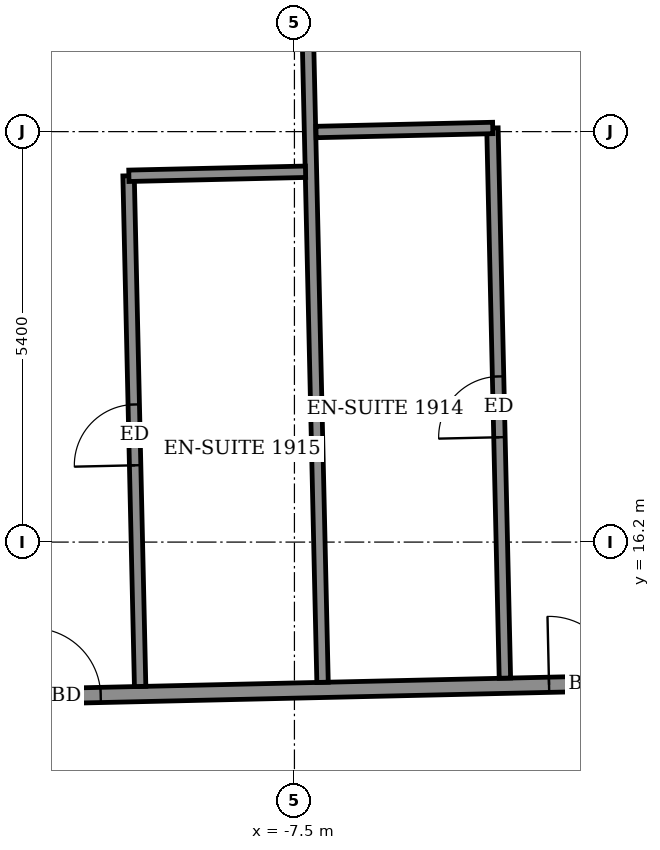
"""IFC4 building model, lengths in metres.
Left out: names, types, materials, properties, quantities, classifications, styles, units other than length and angle.
Written with IfcOpenShell. Run it as: python <this file> out.ifc"""

import sys

from ifc_helpers import new_model, si_unit, direction, frame, frame_2d, origin, place, context, subcontext, project, spatial, rectangle, extrude, element, fill, save


model = new_model("IFC4")
c1 = context("Model", 3, precision=1e-05, world=origin(), true_north=direction((0.0, 1.0)))
c2 = subcontext(c1, "Body", "Model", "MODEL_VIEW")
j1 = project(units=[si_unit("LENGTHUNIT", "METRE"), si_unit("PLANEANGLEUNIT", "RADIAN")], contexts=[c1])
p1 = place(None, origin())
s1 = spatial("IfcSite", under=j1, at=p1, CompositionType="ELEMENT")
p2 = place(p1, origin())
s2 = spatial("IfcBuilding", under=s1, at=p2, CompositionType="ELEMENT")
p3 = place(p2, frame((0.0, 0.0, 79.3)))
s3 = spatial("IfcBuildingStorey", under=s2, at=p3, CompositionType="ELEMENT", Elevation=79.3)
p4 = place(p3, frame((-24.895, 13.852, 0.0), z_axis=(0.0, 0.0, 1.0), x_axis=(0.999742765181, 0.02268046447, 0.0)))
e1 = element("IfcWall", 1, at=p4, inside=s3, PredefinedType="PARTITIONING", context=c2, shape_type="SweptSolid", body=[
    extrude(rectangle(XDim=52.422, YDim=0.2, at=frame_2d((26.211, 0.0))), origin(), (0.0, 0.0, 1.0), 3.05),
])
p5 = place(p4, frame((50.186, 0.0, 0.0)))
e2 = element("IfcOpeningElement", 2, at=p5, cuts=e1, PredefinedType="OPENING", context=c2, shape_type="SweptSolid", body=[
    extrude(rectangle(XDim=1.0, YDim=2.1, at=frame_2d((0.5, 1.05))), frame((0.0, 0.11, 0.0), z_axis=(0.0, -1.0, 0.0), x_axis=(1.0, 0.0, 0.0)), (0.0, 0.0, 1.0), 0.22),
])
p6 = place(p4, frame((45.175, 0.0, 0.0)))
e3 = element("IfcOpeningElement", 3, at=p6, cuts=e1, PredefinedType="OPENING", context=c2, shape_type="SweptSolid", body=[
    extrude(rectangle(XDim=0.9, YDim=2.1, at=frame_2d((0.45, 1.05))), frame((0.0, 0.11, 0.0), z_axis=(0.0, -1.0, 0.0), x_axis=(1.0, 0.0, 0.0)), (0.0, 0.0, 1.0), 0.22),
])
p7 = place(p4, frame((40.625, 0.0, 0.0)))
e4 = element("IfcOpeningElement", 4, at=p7, cuts=e1, PredefinedType="OPENING", context=c2, shape_type="SweptSolid", body=[
    extrude(rectangle(XDim=0.9, YDim=2.1, at=frame_2d((0.45, 1.05))), frame((0.0, 0.11, 0.0), z_axis=(0.0, -1.0, 0.0), x_axis=(1.0, 0.0, 0.0)), (0.0, 0.0, 1.0), 0.22),
])
p8 = place(p4, frame((38.65, 0.0, 0.0)))
e5 = element("IfcOpeningElement", 5, at=p8, cuts=e1, PredefinedType="OPENING", context=c2, shape_type="SweptSolid", body=[
    extrude(rectangle(XDim=0.9, YDim=2.1, at=frame_2d((0.45, 1.05))), frame((0.0, 0.11, 0.0), z_axis=(0.0, -1.0, 0.0), x_axis=(1.0, 0.0, 0.0)), (0.0, 0.0, 1.0), 0.22),
])
p9 = place(p4, frame((31.725, 0.0, 0.0)))
e6 = element("IfcOpeningElement", 6, at=p9, cuts=e1, PredefinedType="OPENING", context=c2, shape_type="SweptSolid", body=[
    extrude(rectangle(XDim=0.9, YDim=2.1, at=frame_2d((0.45, 1.05))), frame((0.0, 0.11, 0.0), z_axis=(0.0, -1.0, 0.0), x_axis=(1.0, 0.0, 0.0)), (0.0, 0.0, 1.0), 0.22),
])
p10 = place(p4, frame((29.575, 0.0, 0.0)))
e7 = element("IfcOpeningElement", 7, at=p10, cuts=e1, PredefinedType="OPENING", context=c2, shape_type="SweptSolid", body=[
    extrude(rectangle(XDim=0.9, YDim=2.1, at=frame_2d((0.45, 1.05))), frame((0.0, 0.11, 0.0), z_axis=(0.0, -1.0, 0.0), x_axis=(1.0, 0.0, 0.0)), (0.0, 0.0, 1.0), 0.22),
])
p11 = place(p4, frame((22.75, 0.0, 0.0)))
e8 = element("IfcOpeningElement", 8, at=p11, cuts=e1, PredefinedType="OPENING", context=c2, shape_type="SweptSolid", body=[
    extrude(rectangle(XDim=0.9, YDim=2.1, at=frame_2d((0.45, 1.05))), frame((0.0, 0.11, 0.0), z_axis=(0.0, -1.0, 0.0), x_axis=(1.0, 0.0, 0.0)), (0.0, 0.0, 1.0), 0.22),
])
p12 = place(p4, frame((20.75, 0.0, 0.0)))
e9 = element("IfcOpeningElement", 9, at=p12, cuts=e1, PredefinedType="OPENING", context=c2, shape_type="SweptSolid", body=[
    extrude(rectangle(XDim=0.9, YDim=2.1, at=frame_2d((0.45, 1.05))), frame((0.0, 0.11, 0.0), z_axis=(0.0, -1.0, 0.0), x_axis=(1.0, 0.0, 0.0)), (0.0, 0.0, 1.0), 0.22),
])
p13 = place(p4, frame((13.95, 0.0, 0.0)))
e10 = element("IfcOpeningElement", 10, at=p13, cuts=e1, PredefinedType="OPENING", context=c2, shape_type="SweptSolid", body=[
    extrude(rectangle(XDim=0.9, YDim=2.1, at=frame_2d((0.45, 1.05))), frame((0.0, 0.11, 0.0), z_axis=(0.0, -1.0, 0.0), x_axis=(1.0, 0.0, 0.0)), (0.0, 0.0, 1.0), 0.22),
])
p14 = place(p4, frame((11.85, 0.0, 0.0)))
e11 = element("IfcOpeningElement", 11, at=p14, cuts=e1, PredefinedType="OPENING", context=c2, shape_type="SweptSolid", body=[
    extrude(rectangle(XDim=0.9, YDim=2.1, at=frame_2d((0.45, 1.05))), frame((0.0, 0.11, 0.0), z_axis=(0.0, -1.0, 0.0), x_axis=(1.0, 0.0, 0.0)), (0.0, 0.0, 1.0), 0.22),
])
p15 = place(p4, frame((1.425, 0.0, 0.0)))
e12 = element("IfcOpeningElement", 12, at=p15, cuts=e1, PredefinedType="OPENING", context=c2, shape_type="SweptSolid", body=[
    extrude(rectangle(XDim=1.0, YDim=2.1, at=frame_2d((0.5, 1.05))), frame((0.0, 0.11, 0.0), z_axis=(0.0, -1.0, 0.0), x_axis=(1.0, 0.0, 0.0)), (0.0, 0.0, 1.0), 0.22),
])
p16 = place(p4, frame((6.925, 0.0, 0.0)))
e13 = element("IfcOpeningElement", 13, at=p16, cuts=e1, PredefinedType="OPENING", context=c2, shape_type="SweptSolid", body=[
    extrude(rectangle(XDim=0.9, YDim=2.1, at=frame_2d((0.45, 1.05))), frame((0.0, 0.11, 0.0), z_axis=(0.0, -1.0, 0.0), x_axis=(1.0, 0.0, 0.0)), (0.0, 0.0, 1.0), 0.22),
])
p17 = place(p3, frame((-9.53, 14.301, 0.0), z_axis=(0.0, 0.0, 1.0), x_axis=(-0.022598435707, 0.999744622743, 0.0)))
e14 = element("IfcWall", 14, at=p17, inside=s3, PredefinedType="PARTITIONING", context=c2, shape_type="SweptSolid", body=[
    extrude(rectangle(XDim=6.72, YDim=0.15, at=frame_2d((3.36, 0.0))), origin(), (0.0, 0.0, 1.0), 3.05),
])
p18 = place(p17, frame((2.91, 0.0, 0.0)))
e15 = element("IfcOpeningElement", 15, at=p18, cuts=e14, PredefinedType="OPENING", context=c2, shape_type="SweptSolid", body=[
    extrude(rectangle(XDim=0.8, YDim=2.1, at=frame_2d((0.4, 1.05))), frame((0.0, 0.085, 0.0), z_axis=(0.0, -1.0, 0.0), x_axis=(1.0, 0.0, 0.0)), (0.0, 0.0, 1.0), 0.17),
])
p19 = place(p3, frame((-7.13, 14.355, 0.0), z_axis=(0.0, 0.0, 1.0), x_axis=(-0.022759867473, 0.999740960666, 0.0)))
e16 = element("IfcWall", 16, at=p19, inside=s3, PredefinedType="PARTITIONING", context=c2, shape_type="SweptSolid", body=[
    extrude(rectangle(XDim=12.4, YDim=0.15, at=frame_2d((6.2, 0.0))), origin(), (0.0, 0.0, 1.0), 2.55),
])
p20 = place(p3, frame((-4.731, 14.41, 0.0), z_axis=(0.0, 0.0, 1.0), x_axis=(-0.022660891034, 0.999743209038, 0.0)))
e17 = element("IfcWall", 17, at=p20, inside=s3, PredefinedType="PARTITIONING", context=c2, shape_type="SweptSolid", body=[
    extrude(rectangle(XDim=7.24, YDim=0.15, at=frame_2d((3.62, 0.0))), origin(), (0.0, 0.0, 1.0), 3.05),
])
p21 = place(p20, frame((3.17, 0.0, 0.0)))
e18 = element("IfcOpeningElement", 18, at=p21, cuts=e17, PredefinedType="OPENING", context=c2, shape_type="SweptSolid", body=[
    extrude(rectangle(XDim=0.8, YDim=2.1, at=frame_2d((0.4, 1.05))), frame((0.0, 0.085, 0.0), z_axis=(0.0, -1.0, 0.0), x_axis=(1.0, 0.0, 0.0)), (0.0, 0.0, 1.0), 0.17),
])
p22 = place(p3, frame((-9.678, 21.019, 0.0), z_axis=(0.0, 0.0, 1.0), x_axis=(0.999740260747, 0.02279059109, 0.0)))
e19 = element("IfcWall", 19, at=p22, inside=s3, PredefinedType="PARTITIONING", context=c2, shape_type="SweptSolid", body=[
    extrude(rectangle(XDim=2.324, YDim=0.15, at=frame_2d((1.162, 0.0))), origin(), (0.0, 0.0, 1.0), 3.05),
])
p23 = place(p3, frame((-7.216, 21.595, 0.0), z_axis=(0.0, 0.0, 1.0), x_axis=(0.999740478815, 0.022781023197, 0.0)))
e20 = element("IfcWall", 20, at=p23, inside=s3, PredefinedType="PARTITIONING", context=c2, shape_type="SweptSolid", body=[
    extrude(rectangle(XDim=2.325, YDim=0.15, at=frame_2d((1.163, 0.0))), origin(), (0.0, 0.0, 1.0), 3.05),
])
p24 = place(p12, origin())
e21 = element("IfcDoor", 21, at=p24, inside=s3, OperationType="SINGLE_SWING_RIGHT", PredefinedType="DOOR", context=c2, shape_type="SweptSolid", body=[
    extrude(rectangle(XDim=0.9, YDim=2.1, at=frame_2d((0.45, 1.05))), frame((0.0, 0.025, 0.0), z_axis=(0.0, -1.0, 0.0), x_axis=(1.0, 0.0, 0.0)), (0.0, 0.0, 1.0), 0.05),
])
fill(e9, e21)
p25 = place(p21, origin())
e22 = element("IfcDoor", 22, at=p25, inside=s3, OperationType="SINGLE_SWING_RIGHT", PredefinedType="DOOR", context=c2, shape_type="SweptSolid", body=[
    extrude(rectangle(XDim=0.8, YDim=2.1, at=frame_2d((0.4, 1.05))), frame((0.0, 0.025, 0.0), z_axis=(0.0, -1.0, 0.0), x_axis=(1.0, 0.0, 0.0)), (0.0, 0.0, 1.0), 0.05),
])
fill(e18, e22)
p26 = place(p13, origin())
e23 = element("IfcDoor", 23, at=p26, inside=s3, OperationType="SINGLE_SWING_LEFT", PredefinedType="DOOR", context=c2, shape_type="SweptSolid", body=[
    extrude(rectangle(XDim=0.9, YDim=2.1, at=frame_2d((0.45, 1.05))), frame((0.0, 0.025, 0.0), z_axis=(0.0, -1.0, 0.0), x_axis=(1.0, 0.0, 0.0)), (0.0, 0.0, 1.0), 0.05),
])
fill(e10, e23)
p27 = place(p18, origin())
e24 = element("IfcDoor", 24, at=p27, inside=s3, OperationType="SINGLE_SWING_LEFT", PredefinedType="DOOR", context=c2, shape_type="SweptSolid", body=[
    extrude(rectangle(XDim=0.8, YDim=2.1, at=frame_2d((0.4, 1.05))), frame((0.0, 0.025, 0.0), z_axis=(0.0, -1.0, 0.0), x_axis=(1.0, 0.0, 0.0)), (0.0, 0.0, 1.0), 0.05),
])
fill(e15, e24)
save(model, sys.argv[1])
